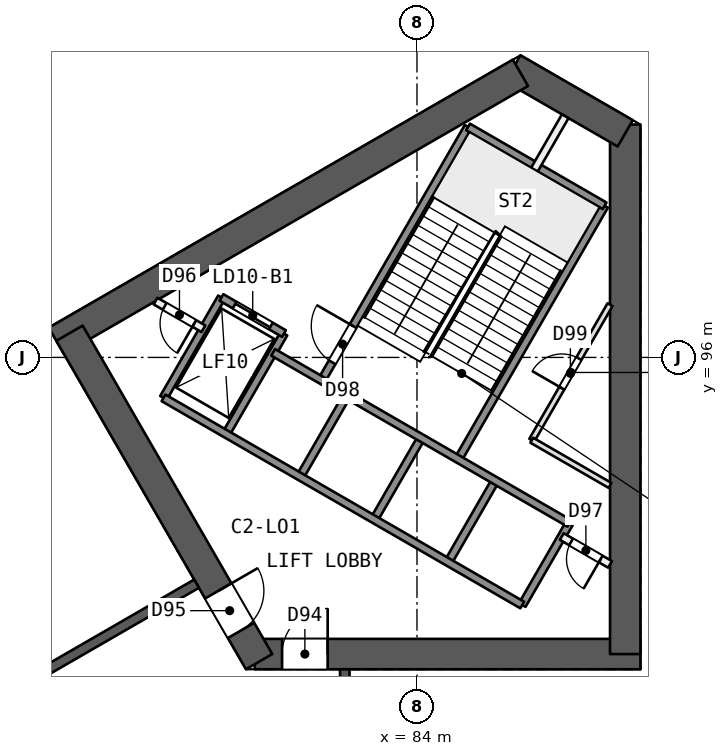
"""IFC4 building model, lengths in metres.
Left out: names, types, materials, properties, quantities, classifications, styles, units other than length and angle.
Written with IfcOpenShell. Run it as: python <this file> out.ifc"""

import sys

from ifc_helpers import new_model, si_unit, direction, frame, frame_2d, origin, place, context, subcontext, project, spatial, rectangle, extrude, element, fill, save


model = new_model("IFC4")
c1 = context("Model", 3, precision=1e-05, world=origin(), true_north=direction((0.0, 1.0)))
c2 = subcontext(c1, "Body", "Model", "MODEL_VIEW")
j1 = project(units=[si_unit("LENGTHUNIT", "METRE"), si_unit("PLANEANGLEUNIT", "RADIAN")], contexts=[c1])
p1 = place(None, origin())
s1 = spatial("IfcSite", under=j1, at=p1, CompositionType="ELEMENT")
p2 = place(p1, origin())
s2 = spatial("IfcBuilding", under=s1, at=p2, CompositionType="ELEMENT")
p3 = place(p2, frame((0.0, 0.0, -4.5)))
s3 = spatial("IfcBuildingStorey", under=s2, at=p3, CompositionType="ELEMENT", Elevation=-4.5)
p4 = place(p3, frame((94.84, 122.4, 0.0), z_axis=(0.0, 0.0, 1.0), x_axis=(-0.866026157749, -0.499998694092, 0.0)))
e1 = element("IfcWall", 1, at=p4, inside=s3, PredefinedType="SOLIDWALL", context=c2, shape_type="SweptSolid", body=[
    extrude(rectangle(XDim=76.937, YDim=0.6, at=frame_2d((38.469, 0.0))), origin(), (0.0, 0.0, 1.0), 4.1),
])
p5 = place(p3, frame((79.731, 88.194, 0.0), z_axis=(0.0, 0.0, 1.0), x_axis=(1.0, 0.0, 0.0)))
e2 = element("IfcWall", 2, at=p5, inside=s3, PredefinedType="SHEAR", context=c2, shape_type="SweptSolid", body=[
    extrude(rectangle(XDim=10.149, YDim=0.8, at=frame_2d((5.074, 0.0))), origin(), (0.0, 0.0, 1.0), 4.5),
])
p6 = place(p5, frame((0.719, 0.0, 0.0)))
e3 = element("IfcOpeningElement", 3, at=p6, cuts=e2, PredefinedType="OPENING", context=c2, shape_type="SweptSolid", body=[
    extrude(rectangle(XDim=1.2, YDim=2.1, at=frame_2d((0.6, 1.05))), frame((0.0, 0.411, 0.0), z_axis=(0.0, -1.0, 0.0), x_axis=(1.0, 0.0, 0.0)), (0.0, 0.0, 1.0), 0.821),
])
p7 = place(p3, frame((89.48, 88.194, 0.0), z_axis=(0.0, 0.0, 1.0), x_axis=(0.0, 1.0, 0.0)))
e4 = element("IfcWall", 4, at=p7, inside=s3, PredefinedType="SHEAR", context=c2, shape_type="SweptSolid", body=[
    extrude(rectangle(XDim=13.933, YDim=0.8, at=frame_2d((6.967, 0.0))), origin(), (0.0, 0.0, 1.0), 4.5),
])
p8 = place(p3, frame((89.48, 101.897, 0.0), z_axis=(0.0, 0.0, 1.0), x_axis=(-0.866034355626, 0.499984494636, 0.0)))
e5 = element("IfcWall", 5, at=p8, inside=s3, PredefinedType="SHEAR", context=c2, shape_type="SweptSolid", body=[
    extrude(rectangle(XDim=3.414, YDim=0.8, at=frame_2d((1.707, 0.0))), origin(), (0.0, 0.0, 1.0), 4.5),
])
p9 = place(p3, frame((86.723, 103.488, 0.0), z_axis=(0.0, 0.0, 1.0), x_axis=(-0.866032504327, -0.499987701298, 0.0)))
e6 = element("IfcWall", 6, at=p9, inside=s3, PredefinedType="SHEAR", context=c2, shape_type="SweptSolid", body=[
    extrude(rectangle(XDim=14.102, YDim=0.8, at=frame_2d((7.051, 0.0))), origin(), (0.0, 0.0, 1.0), 4.5),
])
p10 = place(p3, frame((74.856, 96.637, 0.0), z_axis=(0.0, 0.0, 1.0), x_axis=(0.499993500917, -0.866029155999, 0.0)))
e7 = element("IfcWall", 7, at=p10, inside=s3, PredefinedType="SHEAR", context=c2, shape_type="SweptSolid", body=[
    extrude(rectangle(XDim=9.98, YDim=0.8, at=frame_2d((4.99, 0.0))), origin(), (0.0, 0.0, 1.0), 4.5),
])
p11 = place(p10, frame((7.83, 0.0, 0.0)))
e8 = element("IfcOpeningElement", 8, at=p11, cuts=e7, PredefinedType="OPENING", context=c2, shape_type="SweptSolid", body=[
    extrude(rectangle(XDim=1.2, YDim=2.1, at=frame_2d((0.6, 1.05))), frame((0.0, 0.411, 0.0), z_axis=(0.0, -1.0, 0.0), x_axis=(1.0, 0.0, 0.0)), (0.0, 0.0, 1.0), 0.821),
])
for number, where, z_axis, x_axis in (
    (9, (82.1, 72.206, 0.0), (0.0, 0.0, 1.0), (0.0, 1.0, 0.0)),
    (10, (78.2, 90.046, 0.0), (0.0, 0.0, 1.0), (-0.866, -0.5, 0.0)),
):
    element("IfcWall", number, at=place(p3, frame(where, z_axis=z_axis, x_axis=x_axis)), inside=s3, PredefinedType="SHEAR", context=c2, shape_type="SweptSolid", body=[
        extrude(rectangle(XDim=15.588, YDim=0.25, at=frame_2d((7.794, 0.0))), origin(), (0.0, 0.0, 1.0), 4.1),
    ])
p12 = place(p3, frame((86.77, 89.486, 0.0), z_axis=(0.0, 0.0, 1.0), x_axis=(0.499961042966, 0.86604789447, 0.0)))
e11 = element("IfcWall", 11, at=p12, inside=s3, PredefinedType="SOLIDWALL", context=c2, shape_type="SweptSolid", body=[
    extrude(rectangle(XDim=2.48, YDim=0.2, at=frame_2d((1.24, 0.0))), origin(), (0.0, 0.0, 1.0), 4.1),
])
p13 = place(p3, frame((87.021, 93.821, 0.0), z_axis=(0.0, 0.0, 1.0), x_axis=(0.500028662945, 0.866008854593, 0.0)))
e12 = element("IfcWall", 12, at=p13, inside=s3, PredefinedType="PARTITIONING", context=c2, shape_type="SweptSolid", body=[
    extrude(rectangle(XDim=4.118, YDim=0.15, at=frame_2d((2.059, 0.0))), origin(), (0.0, 0.0, 1.0), 4.1),
])
p14 = place(p13, frame((1.582, 0.0, 0.0)))
e13 = element("IfcOpeningElement", 13, at=p14, cuts=e12, PredefinedType="OPENING", context=c2, shape_type="SweptSolid", body=[
    extrude(rectangle(XDim=0.9, YDim=2.1, at=frame_2d((0.45, 1.05))), frame((0.0, 0.085, 0.0), z_axis=(0.0, -1.0, 0.0), x_axis=(1.0, 0.0, 0.0)), (0.0, 0.0, 1.0), 0.171),
])
p15 = place(p3, frame((84.821, 90.611, 0.0), z_axis=(0.0, 0.0, 1.0), x_axis=(0.499961042966, 0.86604789447, 0.0)))
e14 = element("IfcWall", 14, at=p15, inside=s3, PredefinedType="SOLIDWALL", context=c2, shape_type="SweptSolid", body=[
    extrude(rectangle(XDim=2.48, YDim=0.2, at=frame_2d((1.24, 0.0))), origin(), (0.0, 0.0, 1.0), 4.1),
])
p16 = place(p3, frame((85.087, 93.321, 0.0), z_axis=(0.0, 0.0, 1.0), x_axis=(0.500019787375, 0.866013979237, 0.0)))
e15 = element("IfcWall", 15, at=p16, inside=s3, PredefinedType="SOLIDWALL", context=c2, shape_type="SweptSolid", body=[
    extrude(rectangle(XDim=7.7, YDim=0.2, at=frame_2d((3.85, 0.0))), origin(), (0.0, 0.0, 1.0), 4.1),
])
p17 = place(p3, frame((82.873, 91.736, 0.0), z_axis=(0.0, 0.0, 1.0), x_axis=(0.499961042966, 0.86604789447, 0.0)))
e16 = element("IfcWall", 16, at=p17, inside=s3, PredefinedType="SOLIDWALL", context=c2, shape_type="SweptSolid", body=[
    extrude(rectangle(XDim=2.48, YDim=0.2, at=frame_2d((1.24, 0.0))), origin(), (0.0, 0.0, 1.0), 4.1),
])
p18 = place(p3, frame((87.09, 100.94, 0.0), z_axis=(0.0, 0.0, 1.0), x_axis=(0.499956811548, 0.866050337213, 0.0)))
e17 = element("IfcWall", 17, at=p18, inside=s3, PredefinedType="PARTITIONING", context=c2, shape_type="SweptSolid", body=[
    extrude(rectangle(XDim=1.623, YDim=0.2, at=frame_2d((0.812, 0.0))), origin(), (0.0, 0.0, 1.0), 4.1),
])
p19 = place(p3, frame((80.924, 92.861, 0.0), z_axis=(0.0, 0.0, 1.0), x_axis=(0.499961042966, 0.86604789447, 0.0)))
e18 = element("IfcWall", 18, at=p19, inside=s3, PredefinedType="SOLIDWALL", context=c2, shape_type="SweptSolid", body=[
    extrude(rectangle(XDim=2.48, YDim=0.2, at=frame_2d((1.24, 0.0))), origin(), (0.0, 0.0, 1.0), 4.1),
])
p20 = place(p3, frame((81.493, 95.396, 0.0), z_axis=(0.0, 0.0, 1.0), x_axis=(0.500006057782, 0.866021906294, 0.0)))
e19 = element("IfcWall", 19, at=p20, inside=s3, PredefinedType="SOLIDWALL", context=c2, shape_type="SweptSolid", body=[
    extrude(rectangle(XDim=7.7, YDim=0.2, at=frame_2d((3.85, 0.0))), origin(), (0.0, 0.0, 1.0), 4.1),
])
p21 = place(p20, frame((0.55, 0.0, 0.0)))
e20 = element("IfcOpeningElement", 20, at=p21, cuts=e19, PredefinedType="OPENING", context=c2, shape_type="SweptSolid", body=[
    extrude(rectangle(XDim=1.1, YDim=2.1, at=frame_2d((0.55, 1.05))), frame((0.0, 0.11, 0.0), z_axis=(0.0, -1.0, 0.0), x_axis=(1.0, 0.0, 0.0)), (0.0, 0.0, 1.0), 0.221),
])
for number, where, z_axis, x_axis in (
    (21, (78.976, 93.986, 0.0), (0.0, 0.0, 1.0), (0.5, 0.866, 0.0)),
    (22, (77.33, 94.936, 0.0), (0.0, 0.0, 1.0), (0.5, 0.866, 0.0)),
):
    element("IfcWall", number, at=place(p3, frame(where, z_axis=z_axis, x_axis=x_axis)), inside=s3, PredefinedType="SOLIDWALL", context=c2, shape_type="SweptSolid", body=[
        extrude(rectangle(XDim=3.05, YDim=0.2, at=frame_2d((1.525, 0.0))), origin(), (0.0, 0.0, 1.0), 4.1),
    ])
p22 = place(p3, frame((86.77, 89.486, 0.0), z_axis=(0.0, 0.0, 1.0), x_axis=(-0.86601811187, 0.500012629753, 0.0)))
e23 = element("IfcWall", 23, at=p22, inside=s3, PredefinedType="SOLIDWALL", context=c2, shape_type="SweptSolid", body=[
    extrude(rectangle(XDim=10.9, YDim=0.2, at=frame_2d((5.45, 0.0))), origin(), (0.0, 0.0, 1.0), 4.1),
])
p23 = place(p3, frame((89.08, 90.554, 0.0), z_axis=(0.0, 0.0, 1.0), x_axis=(-0.866022048785, 0.500005810984, 0.0)))
e24 = element("IfcWall", 24, at=p23, inside=s3, PredefinedType="PARTITIONING", context=c2, shape_type="SweptSolid", body=[
    extrude(rectangle(XDim=1.467, YDim=0.2, at=frame_2d((0.733, 0.0))), origin(), (0.0, 0.0, 1.0), 4.1),
])
p24 = place(p23, frame((0.283, 0.0, 0.0)))
e25 = element("IfcOpeningElement", 25, at=p24, cuts=e24, PredefinedType="OPENING", context=c2, shape_type="SweptSolid", body=[
    extrude(rectangle(XDim=0.9, YDim=2.1, at=frame_2d((0.45, 1.05))), frame((0.0, 0.11, 0.0), z_axis=(0.0, -1.0, 0.0), x_axis=(1.0, 0.0, 0.0)), (0.0, 0.0, 1.0), 0.221),
])
p25 = place(p3, frame((78.38, 96.755, 0.0), z_axis=(0.0, 0.0, 1.0), x_axis=(-0.866003949776, 0.500037157592, 0.0)))
e26 = element("IfcWall", 26, at=p25, inside=s3, PredefinedType="PARTITIONING", context=c2, shape_type="SweptSolid", body=[
    extrude(rectangle(XDim=1.455, YDim=0.2, at=frame_2d((0.728, 0.0))), origin(), (0.0, 0.0, 1.0), 4.1),
])
p26 = place(p25, frame((0.278, 0.0, 0.0)))
e27 = element("IfcOpeningElement", 27, at=p26, cuts=e26, PredefinedType="OPENING", context=c2, shape_type="SweptSolid", body=[
    extrude(rectangle(XDim=0.9, YDim=2.1, at=frame_2d((0.45, 1.05))), frame((0.0, 0.11, 0.0), z_axis=(0.0, -1.0, 0.0), x_axis=(1.0, 0.0, 0.0)), (0.0, 0.0, 1.0), 0.221),
])
p27 = place(p3, frame((88.01, 91.634, 0.0), z_axis=(0.0, 0.0, 1.0), x_axis=(-0.866024315419, 0.5000018851, 0.0)))
e28 = element("IfcWall", 28, at=p27, inside=s3, PredefinedType="SOLIDWALL", context=c2, shape_type="SweptSolid", body=[
    extrude(rectangle(XDim=9.0, YDim=0.2, at=frame_2d((4.5, 0.0))), origin(), (0.0, 0.0, 1.0), 4.1),
])
p28 = place(p3, frame((80.5, 96.627, 0.0), z_axis=(0.0, 0.0, 1.0), x_axis=(-0.86601224135, 0.500022797313, 0.0)))
e29 = element("IfcWall", 29, at=p28, inside=s3, PredefinedType="SOLIDWALL", context=c2, shape_type="SweptSolid", body=[
    extrude(rectangle(XDim=1.9, YDim=0.2, at=frame_2d((0.95, 0.0))), origin(), (0.0, 0.0, 1.0), 4.1),
])
p29 = place(p28, frame((0.4, 0.0, 0.0)))
e30 = element("IfcOpeningElement", 30, at=p29, cuts=e29, PredefinedType="OPENING", context=c2, shape_type="SweptSolid", body=[
    extrude(rectangle(XDim=1.1, YDim=2.1, at=frame_2d((0.55, 1.05))), frame((0.0, 0.11, 0.0), z_axis=(0.0, -1.0, 0.0), x_axis=(1.0, 0.0, 0.0)), (0.0, 0.0, 1.0), 0.221),
])
p30 = place(p3, frame((89.08, 92.632, 0.0), z_axis=(0.0, 0.0, 1.0), x_axis=(-0.866041951395, 0.499971337603, 0.0)))
e31 = element("IfcWall", 31, at=p30, inside=s3, PredefinedType="PARTITIONING", context=c2, shape_type="SweptSolid", body=[
    extrude(rectangle(XDim=2.378, YDim=0.15, at=frame_2d((1.189, 0.0))), origin(), (0.0, 0.0, 1.0), 4.1),
])
p31 = place(p3, frame((88.937, 99.99, 0.0), z_axis=(0.0, 0.0, 1.0), x_axis=(-0.866004344652, 0.500036473714, 0.0)))
e32 = element("IfcWall", 32, at=p31, inside=s3, PredefinedType="SOLIDWALL", context=c2, shape_type="SweptSolid", body=[
    extrude(rectangle(XDim=4.15, YDim=0.2, at=frame_2d((2.075, 0.0))), origin(), (0.0, 0.0, 1.0), 4.1),
])
p32 = place(p6, origin())
e33 = element("IfcDoor", 33, at=p32, inside=s3, OperationType="SINGLE_SWING_RIGHT", PredefinedType="NOTDEFINED", context=c2, shape_type="SweptSolid", body=[
    extrude(rectangle(XDim=1.2, YDim=2.1, at=frame_2d((0.6, 1.05))), frame((0.0, 0.025, 0.0), z_axis=(0.0, -1.0, 0.0), x_axis=(1.0, 0.0, 0.0)), (0.0, 0.0, 1.0), 0.05),
])
fill(e3, e33)
p33 = place(p11, origin())
e34 = element("IfcDoor", 34, at=p33, inside=s3, OperationType="SINGLE_SWING_LEFT", PredefinedType="NOTDEFINED", context=c2, shape_type="SweptSolid", body=[
    extrude(rectangle(XDim=1.2, YDim=2.1, at=frame_2d((0.6, 1.05))), frame((0.0, 0.025, 0.0), z_axis=(0.0, -1.0, 0.0), x_axis=(1.0, 0.0, 0.0)), (0.0, 0.0, 1.0), 0.05),
])
fill(e8, e34)
p34 = place(p29, origin())
e35 = element("IfcDoor", 35, at=p34, inside=s3, OperationType="SLIDING_TO_RIGHT", PredefinedType="NOTDEFINED", context=c2, shape_type="SweptSolid", body=[
    extrude(rectangle(XDim=1.1, YDim=2.1, at=frame_2d((0.55, 1.05))), frame((0.0, 0.025, 0.0), z_axis=(0.0, -1.0, 0.0), x_axis=(1.0, 0.0, 0.0)), (0.0, 0.0, 1.0), 0.05),
])
fill(e30, e35)
p35 = place(p26, origin())
e36 = element("IfcDoor", 36, at=p35, inside=s3, OperationType="SINGLE_SWING_LEFT", PredefinedType="NOTDEFINED", context=c2, shape_type="SweptSolid", body=[
    extrude(rectangle(XDim=0.9, YDim=2.1, at=frame_2d((0.45, 1.05))), frame((0.0, 0.025, 0.0), z_axis=(0.0, -1.0, 0.0), x_axis=(1.0, 0.0, 0.0)), (0.0, 0.0, 1.0), 0.05),
])
fill(e27, e36)
p36 = place(p24, origin())
e37 = element("IfcDoor", 37, at=p36, inside=s3, OperationType="SINGLE_SWING_LEFT", PredefinedType="NOTDEFINED", context=c2, shape_type="SweptSolid", body=[
    extrude(rectangle(XDim=0.9, YDim=2.1, at=frame_2d((0.45, 1.05))), frame((0.0, 0.025, 0.0), z_axis=(0.0, -1.0, 0.0), x_axis=(1.0, 0.0, 0.0)), (0.0, 0.0, 1.0), 0.05),
])
fill(e25, e37)
p37 = place(p21, origin())
e38 = element("IfcDoor", 38, at=p37, inside=s3, OperationType="SINGLE_SWING_RIGHT", PredefinedType="NOTDEFINED", context=c2, shape_type="SweptSolid", body=[
    extrude(rectangle(XDim=1.1, YDim=2.1, at=frame_2d((0.55, 1.05))), frame((0.0, 0.025, 0.0), z_axis=(0.0, -1.0, 0.0), x_axis=(1.0, 0.0, 0.0)), (0.0, 0.0, 1.0), 0.05),
])
fill(e20, e38)
p38 = place(p14, origin())
e39 = element("IfcDoor", 39, at=p38, inside=s3, OperationType="SINGLE_SWING_LEFT", PredefinedType="NOTDEFINED", context=c2, shape_type="SweptSolid", body=[
    extrude(rectangle(XDim=0.9, YDim=2.1, at=frame_2d((0.45, 1.05))), frame((0.0, 0.025, 0.0), z_axis=(0.0, -1.0, 0.0), x_axis=(1.0, 0.0, 0.0)), (0.0, 0.0, 1.0), 0.05),
])
fill(e13, e39)
save(model, sys.argv[1])
